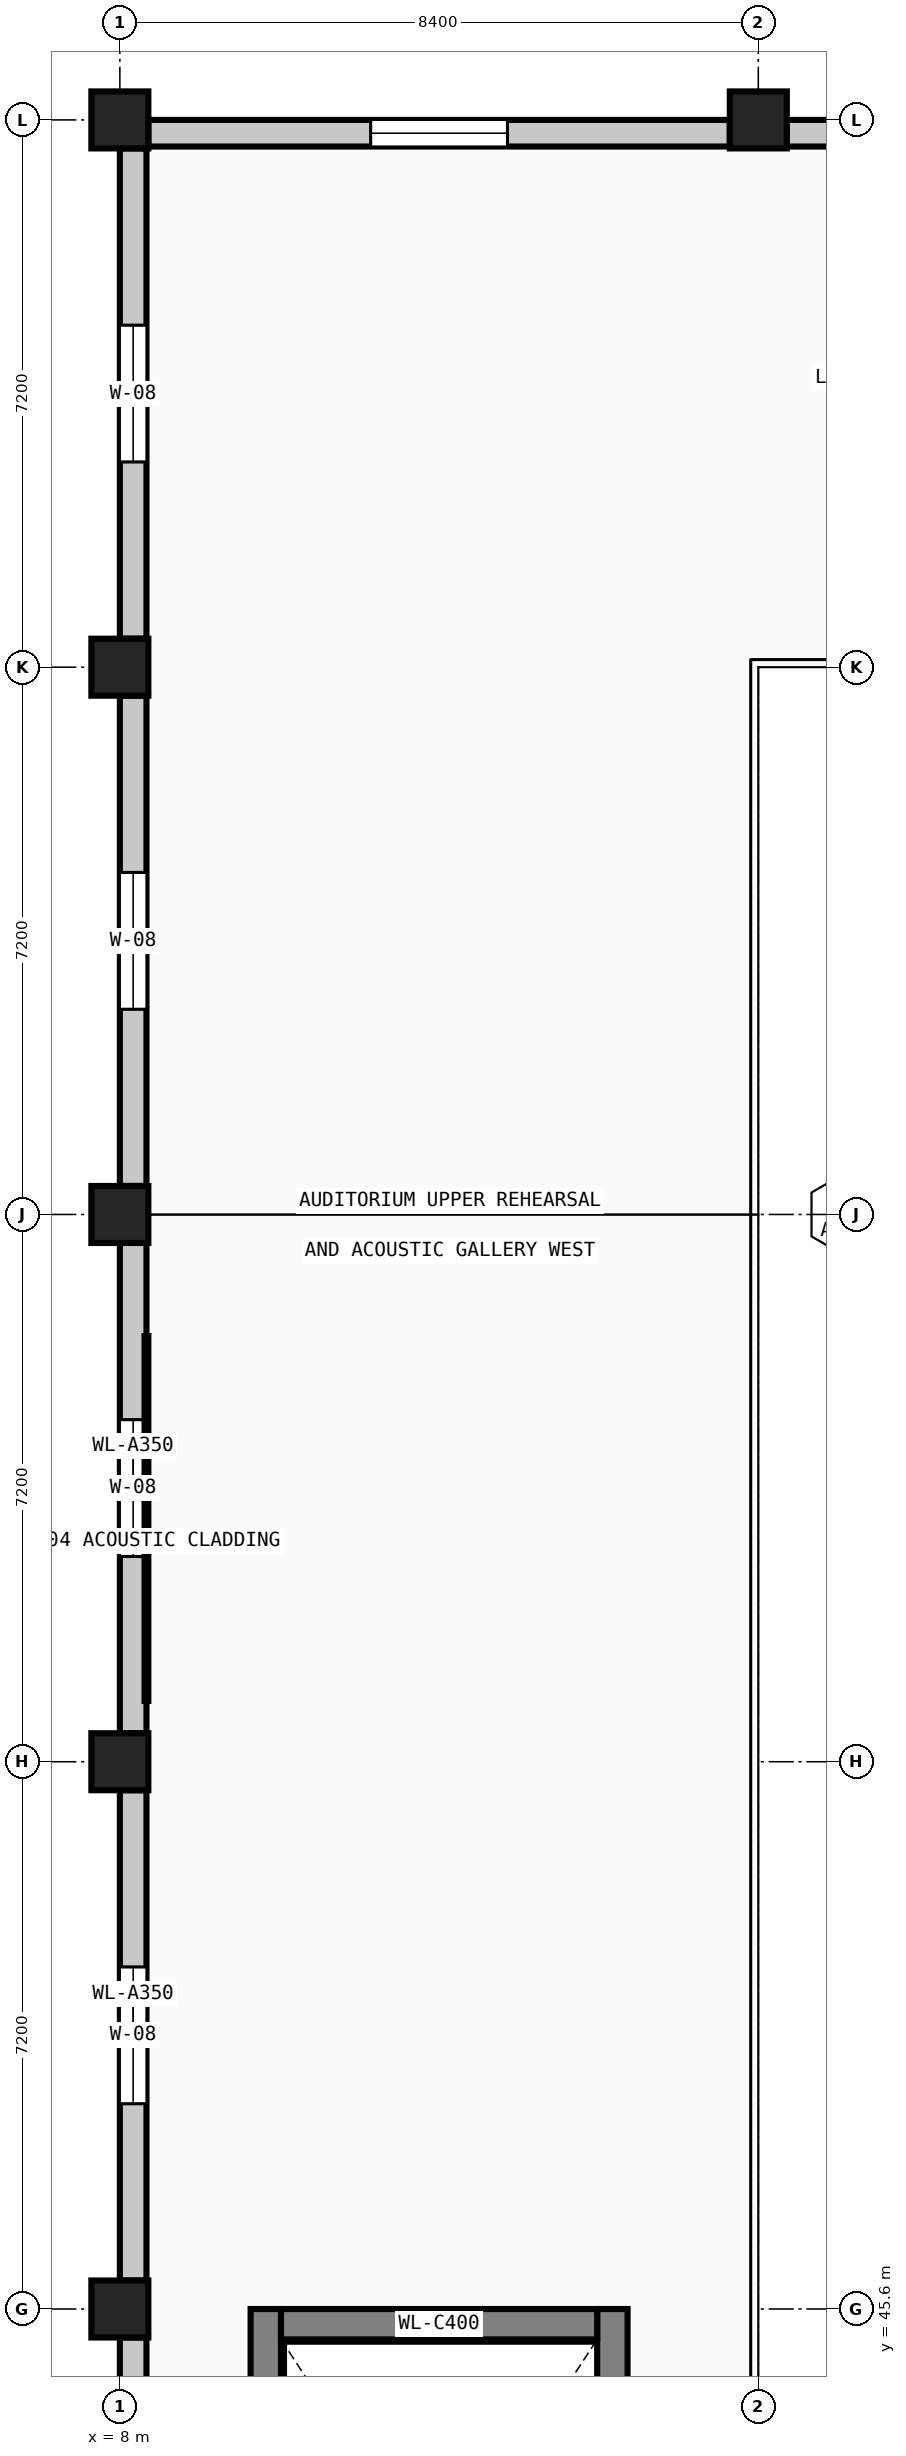
"""IFC4 building model, lengths in metres.
Left out: names, types, materials, properties, quantities, classifications, styles, units other than length and angle.
Written with IfcOpenShell. Run it as: python <this file> out.ifc"""

import sys

from ifc_helpers import new_model, si_unit, direction, frame, frame_2d, origin, origin_2d, place, context, subcontext, project, spatial, rectangle, extrude, element, fill, save


model = new_model("IFC4")
c1 = context("Model", 3, precision=1e-05, world=origin(), true_north=direction((0.0, 1.0)))
c2 = subcontext(c1, "Body", "Model", "MODEL_VIEW")
j1 = project(units=[si_unit("LENGTHUNIT", "METRE"), si_unit("PLANEANGLEUNIT", "RADIAN")], contexts=[c1])
p1 = place(None, origin())
s1 = spatial("IfcSite", under=j1, at=p1, CompositionType="ELEMENT")
p2 = place(p1, origin())
s2 = spatial("IfcBuilding", under=s1, at=p2, CompositionType="ELEMENT")
p3 = place(p2, frame((0.0, 0.0, 9.6)))
s3 = spatial("IfcBuildingStorey", under=s2, at=p3, CompositionType="ELEMENT", Elevation=9.6)
for number, where, z_axis, x_axis in (
    (1, (8.0, 45.6, 0.0), (0.0, 0.0, 1.0), (1.0, 0.0, 0.0)),
    (2, (8.0, 52.8, 0.0), (0.0, 0.0, 1.0), (1.0, 0.0, 0.0)),
    (3, (8.0, 60.0, 0.0), (0.0, 0.0, 1.0), (1.0, 0.0, 0.0)),
    (4, (8.0, 67.2, 0.0), (0.0, 0.0, 1.0), (1.0, 0.0, 0.0)),
    (5, (8.0, 74.4, 0.0), (0.0, 0.0, 1.0), (1.0, 0.0, 0.0)),
    (6, (16.4, 74.4, 0.0), (0.0, 0.0, 1.0), (1.0, 0.0, 0.0)),
):
    element("IfcColumn", number, at=place(p3, frame(where, z_axis=z_axis, x_axis=x_axis)), inside=s3, PredefinedType="COLUMN", context=c2, shape_type="SweptSolid", body=[
        extrude(rectangle(XDim=0.75, YDim=0.75, at=origin_2d()), origin(), (0.0, 0.0, 1.0), 4.8),
    ])
for number, where, z_axis, x_axis in (
    (7, (9.92, 36.4, 0.0), (0.0, 0.0, 1.0), (0.0, 1.0, 0.0)),
    (8, (14.48, 45.6, 0.0), (0.0, 0.0, 1.0), (0.0, -1.0, 0.0)),
):
    element("IfcWall", number, at=place(p3, frame(where, z_axis=z_axis, x_axis=x_axis)), inside=s3, PredefinedType="SHEAR", context=c2, shape_type="SweptSolid", body=[
        extrude(rectangle(XDim=9.2, YDim=0.4, at=frame_2d((4.6, 0.0))), origin(), (0.0, 0.0, 1.0), 4.575),
    ])
p4 = place(p3, frame((10.12, 45.4, 0.0), z_axis=(0.0, 0.0, 1.0), x_axis=(1.0, 0.0, 0.0)))
e9 = element("IfcWall", 9, at=p4, inside=s3, PredefinedType="SHEAR", context=c2, shape_type="SweptSolid", body=[
    extrude(rectangle(XDim=4.16, YDim=0.4, at=frame_2d((2.08, 0.0))), origin(), (0.0, 0.0, 1.0), 4.575),
])
p5 = place(p3, frame((8.175, 38.775, 0.0), z_axis=(0.0, 0.0, 1.0), x_axis=(0.0, 1.0, 0.0)))
e10 = element("IfcWall", 10, at=p5, inside=s3, PredefinedType="SOLIDWALL", context=c2, shape_type="SweptSolid", body=[
    extrude(rectangle(XDim=6.45, YDim=0.35, at=frame_2d((3.225, 0.0))), origin(), (0.0, 0.0, 1.0), 4.55),
])
p6 = place(p5, frame((2.325, 0.0, 2.2)))
e11 = element("IfcOpeningElement", 11, at=p6, cuts=e10, PredefinedType="OPENING", context=c2, shape_type="SweptSolid", body=[
    extrude(rectangle(XDim=1.8, YDim=1.35, at=frame_2d((0.9, 0.675))), frame((0.0, 0.185, 0.0), z_axis=(0.0, -1.0, 0.0), x_axis=(1.0, 0.0, 0.0)), (0.0, 0.0, 1.0), 0.37),
])
p7 = place(p3, frame((8.175, 45.975, 0.0), z_axis=(0.0, 0.0, 1.0), x_axis=(0.0, 1.0, 0.0)))
e12 = element("IfcWall", 12, at=p7, inside=s3, PredefinedType="SOLIDWALL", context=c2, shape_type="SweptSolid", body=[
    extrude(rectangle(XDim=6.45, YDim=0.35, at=frame_2d((3.225, 0.0))), origin(), (0.0, 0.0, 1.0), 4.55),
])
p8 = place(p7, frame((2.325, 0.0, 2.2)))
e13 = element("IfcOpeningElement", 13, at=p8, cuts=e12, PredefinedType="OPENING", context=c2, shape_type="SweptSolid", body=[
    extrude(rectangle(XDim=1.8, YDim=1.35, at=frame_2d((0.9, 0.675))), frame((0.0, 0.185, 0.0), z_axis=(0.0, -1.0, 0.0), x_axis=(1.0, 0.0, 0.0)), (0.0, 0.0, 1.0), 0.37),
])
p9 = place(p3, frame((8.175, 53.175, 0.0), z_axis=(0.0, 0.0, 1.0), x_axis=(0.0, 1.0, 0.0)))
e14 = element("IfcWall", 14, at=p9, inside=s3, PredefinedType="SOLIDWALL", context=c2, shape_type="SweptSolid", body=[
    extrude(rectangle(XDim=6.45, YDim=0.35, at=frame_2d((3.225, 0.0))), origin(), (0.0, 0.0, 1.0), 4.55),
])
p10 = place(p9, frame((2.325, 0.0, 2.2)))
e15 = element("IfcOpeningElement", 15, at=p10, cuts=e14, PredefinedType="OPENING", context=c2, shape_type="SweptSolid", body=[
    extrude(rectangle(XDim=1.8, YDim=1.35, at=frame_2d((0.9, 0.675))), frame((0.0, 0.185, 0.0), z_axis=(0.0, -1.0, 0.0), x_axis=(1.0, 0.0, 0.0)), (0.0, 0.0, 1.0), 0.37),
])
p11 = place(p3, frame((8.175, 60.375, 0.0), z_axis=(0.0, 0.0, 1.0), x_axis=(0.0, 1.0, 0.0)))
e16 = element("IfcWall", 16, at=p11, inside=s3, PredefinedType="SOLIDWALL", context=c2, shape_type="SweptSolid", body=[
    extrude(rectangle(XDim=6.45, YDim=0.35, at=frame_2d((3.225, 0.0))), origin(), (0.0, 0.0, 1.0), 4.55),
])
p12 = place(p11, frame((2.325, 0.0, 2.2)))
e17 = element("IfcOpeningElement", 17, at=p12, cuts=e16, PredefinedType="OPENING", context=c2, shape_type="SweptSolid", body=[
    extrude(rectangle(XDim=1.8, YDim=1.35, at=frame_2d((0.9, 0.675))), frame((0.0, 0.185, 0.0), z_axis=(0.0, -1.0, 0.0), x_axis=(1.0, 0.0, 0.0)), (0.0, 0.0, 1.0), 0.37),
])
p13 = place(p3, frame((8.175, 67.575, 0.0), z_axis=(0.0, 0.0, 1.0), x_axis=(0.0, 1.0, 0.0)))
e18 = element("IfcWall", 18, at=p13, inside=s3, PredefinedType="SOLIDWALL", context=c2, shape_type="SweptSolid", body=[
    extrude(rectangle(XDim=6.45, YDim=0.35, at=frame_2d((3.225, 0.0))), origin(), (0.0, 0.0, 1.0), 4.55),
])
p14 = place(p13, frame((2.325, 0.0, 2.2)))
e19 = element("IfcOpeningElement", 19, at=p14, cuts=e18, PredefinedType="OPENING", context=c2, shape_type="SweptSolid", body=[
    extrude(rectangle(XDim=1.8, YDim=1.35, at=frame_2d((0.9, 0.675))), frame((0.0, 0.185, 0.0), z_axis=(0.0, -1.0, 0.0), x_axis=(1.0, 0.0, 0.0)), (0.0, 0.0, 1.0), 0.37),
])
p15 = place(p3, frame((8.375, 74.225, 0.0), z_axis=(0.0, 0.0, 1.0), x_axis=(1.0, 0.0, 0.0)))
e20 = element("IfcWall", 20, at=p15, inside=s3, PredefinedType="SOLIDWALL", context=c2, shape_type="SweptSolid", body=[
    extrude(rectangle(XDim=7.65, YDim=0.35, at=frame_2d((3.825, 0.0))), origin(), (0.0, 0.0, 1.0), 4.55),
])
p16 = place(p15, frame((2.925, 0.0, 2.2)))
e21 = element("IfcOpeningElement", 21, at=p16, cuts=e20, PredefinedType="OPENING", context=c2, shape_type="SweptSolid", body=[
    extrude(rectangle(XDim=1.8, YDim=1.35, at=frame_2d((0.9, 0.675))), frame((0.0, 0.185, 0.0), z_axis=(0.0, -1.0, 0.0), x_axis=(1.0, 0.0, 0.0)), (0.0, 0.0, 1.0), 0.37),
])
p17 = place(p3, frame((16.775, 74.225, 0.0), z_axis=(0.0, 0.0, 1.0), x_axis=(1.0, 0.0, 0.0)))
e22 = element("IfcWall", 22, at=p17, inside=s3, PredefinedType="SOLIDWALL", context=c2, shape_type="SweptSolid", body=[
    extrude(rectangle(XDim=7.65, YDim=0.35, at=frame_2d((3.825, 0.0))), origin(), (0.0, 0.0, 1.0), 4.55),
])
p18 = place(p17, frame((2.925, 0.0, 2.2)))
e23 = element("IfcOpeningElement", 23, at=p18, cuts=e22, PredefinedType="OPENING", context=c2, shape_type="SweptSolid", body=[
    extrude(rectangle(XDim=1.8, YDim=1.35, at=frame_2d((0.9, 0.675))), frame((0.0, 0.185, 0.0), z_axis=(0.0, -1.0, 0.0), x_axis=(1.0, 0.0, 0.0)), (0.0, 0.0, 1.0), 0.37),
])
p19 = place(p8, origin())
e24 = element("IfcWindow", 24, at=p19, inside=s3, PartitioningType="SINGLE_PANEL", PredefinedType="WINDOW", context=c2, shape_type="SweptSolid", body=[
    extrude(rectangle(XDim=1.8, YDim=1.35, at=frame_2d((0.9, 0.675))), frame((0.0, 0.03, 0.0), z_axis=(0.0, -1.0, 0.0), x_axis=(1.0, 0.0, 0.0)), (0.0, 0.0, 1.0), 0.06),
])
fill(e13, e24)
p20 = place(p10, origin())
e25 = element("IfcWindow", 25, at=p20, inside=s3, PartitioningType="SINGLE_PANEL", PredefinedType="WINDOW", context=c2, shape_type="SweptSolid", body=[
    extrude(rectangle(XDim=1.8, YDim=1.35, at=frame_2d((0.9, 0.675))), frame((0.0, 0.03, 0.0), z_axis=(0.0, -1.0, 0.0), x_axis=(1.0, 0.0, 0.0)), (0.0, 0.0, 1.0), 0.06),
])
fill(e15, e25)
p21 = place(p12, origin())
e26 = element("IfcWindow", 26, at=p21, inside=s3, PartitioningType="SINGLE_PANEL", PredefinedType="WINDOW", context=c2, shape_type="SweptSolid", body=[
    extrude(rectangle(XDim=1.8, YDim=1.35, at=frame_2d((0.9, 0.675))), frame((0.0, 0.03, 0.0), z_axis=(0.0, -1.0, 0.0), x_axis=(1.0, 0.0, 0.0)), (0.0, 0.0, 1.0), 0.06),
])
fill(e17, e26)
p22 = place(p14, origin())
e27 = element("IfcWindow", 27, at=p22, inside=s3, PartitioningType="SINGLE_PANEL", PredefinedType="WINDOW", context=c2, shape_type="SweptSolid", body=[
    extrude(rectangle(XDim=1.8, YDim=1.35, at=frame_2d((0.9, 0.675))), frame((0.0, 0.03, 0.0), z_axis=(0.0, -1.0, 0.0), x_axis=(1.0, 0.0, 0.0)), (0.0, 0.0, 1.0), 0.06),
])
fill(e19, e27)
p23 = place(p16, origin())
e28 = element("IfcWindow", 28, at=p23, inside=s3, PartitioningType="SINGLE_PANEL", PredefinedType="WINDOW", context=c2, shape_type="SweptSolid", body=[
    extrude(rectangle(XDim=1.8, YDim=1.35, at=frame_2d((0.9, 0.675))), frame((0.0, 0.03, 0.0), z_axis=(0.0, -1.0, 0.0), x_axis=(1.0, 0.0, 0.0)), (0.0, 0.0, 1.0), 0.06),
])
fill(e21, e28)
save(model, sys.argv[1])
